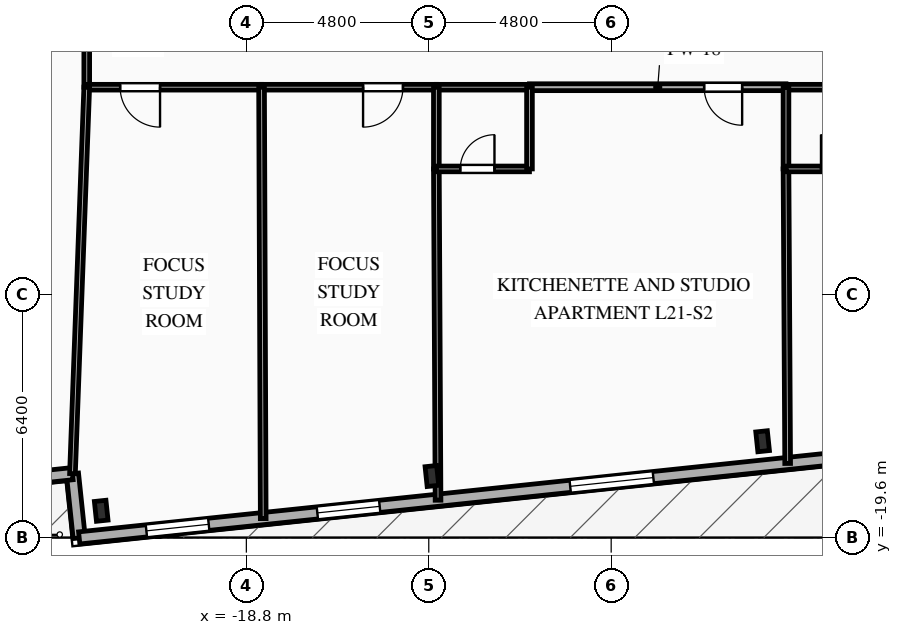
"""IFC4 building model, lengths in metres.
Left out: names, types, materials, properties, quantities, classifications, styles, units other than length and angle.
Written with IfcOpenShell. Run it as: python <this file> out.ifc"""

import sys

from ifc_helpers import new_model, si_unit, direction, frame, frame_2d, origin, origin_2d, place, context, subcontext, project, spatial, rectangle, i_section, extrude, element, fill, save


model = new_model("IFC4")
c1 = context("Model", 3, precision=1e-05, world=origin(), true_north=direction((0.0, 1.0)))
c2 = subcontext(c1, "Body", "Model", "MODEL_VIEW")
j1 = project(units=[si_unit("LENGTHUNIT", "METRE"), si_unit("PLANEANGLEUNIT", "RADIAN")], contexts=[c1])
p1 = place(None, origin())
s1 = spatial("IfcSite", under=j1, at=p1, CompositionType="ELEMENT")
p2 = place(p1, origin())
s2 = spatial("IfcBuilding", under=s1, at=p2, CompositionType="ELEMENT")
p3 = place(p2, frame((0.0, 0.0, 79.0)))
s3 = spatial("IfcBuildingStorey", under=s2, at=p3, CompositionType="ELEMENT", Elevation=79.0)
for number, where, z_axis, x_axis in (
    (1, (-22.619, -18.895, 0.0), (0.0, 0.0, 1.0), (0.995, 0.105, 0.0)),
    (2, (-13.917, -17.98, 0.0), (0.0, 0.0, 1.0), (0.995, 0.105, 0.0)),
    (3, (-5.215, -17.066, 0.0), (0.0, 0.0, 1.0), (0.995, 0.105, 0.0)),
):
    element("IfcColumn", number, at=place(p3, frame(where, z_axis=z_axis, x_axis=x_axis)), inside=s3, PredefinedType="COLUMN", context=c2, shape_type="SweptSolid", body=[
        extrude(i_section(OverallWidth=0.306, OverallDepth=0.524, WebThickness=0.021, FlangeThickness=0.04, FilletRadius=0.027, at=origin_2d()), origin(), (0.0, 0.0, 1.0), 3.35),
    ])
for number, where, z_axis, x_axis in (
    (4, (-23.198, -19.609, 0.0), (0.0, 0.0, 1.0), (-0.105, 0.995, 0.0)),
    (5, (-23.376, -17.919, 0.0), (0.0, 0.0, 1.0), (-0.995, -0.105, 0.0)),
):
    element("IfcWall", number, at=place(p3, frame(where, z_axis=z_axis, x_axis=x_axis)), inside=s3, PredefinedType="SOLIDWALL", context=c2, shape_type="SweptSolid", body=[
        extrude(rectangle(XDim=1.7, YDim=0.32, at=frame_2d((0.85, 0.0))), origin(), (0.0, 0.0, 1.0), 3.045),
    ])
p4 = place(p3, frame((30.307, -13.986, 0.0), z_axis=(0.0, 0.0, 1.0), x_axis=(-0.994521628355, -0.104531003701, 0.0)))
e6 = element("IfcWall", 6, at=p4, inside=s3, PredefinedType="SOLIDWALL", context=c2, shape_type="SweptSolid", body=[
    extrude(rectangle(XDim=53.8, YDim=0.32, at=frame_2d((26.9, 0.0))), origin(), (0.0, 0.0, 1.0), 3.045),
])
p5 = place(p4, frame((11.144, 0.0, 0.85)))
e7 = element("IfcOpeningElement", 7, at=p5, cuts=e6, PredefinedType="OPENING", context=c2, shape_type="SweptSolid", body=[
    extrude(rectangle(XDim=1.65, YDim=1.85, at=frame_2d((0.825, 0.925))), frame((0.0, 0.17, 0.0), z_axis=(0.0, -1.0, 0.0), x_axis=(1.0, 0.0, 0.0)), (0.0, 0.0, 1.0), 0.34),
])
p6 = place(p4, frame((20.116, 0.0, 0.85)))
e8 = element("IfcOpeningElement", 8, at=p6, cuts=e6, PredefinedType="OPENING", context=c2, shape_type="SweptSolid", body=[
    extrude(rectangle(XDim=2.2, YDim=1.85, at=frame_2d((1.1, 0.925))), frame((0.0, 0.17, 0.0), z_axis=(0.0, -1.0, 0.0), x_axis=(1.0, 0.0, 0.0)), (0.0, 0.0, 1.0), 0.34),
])
p7 = place(p4, frame((29.363, 0.0, 0.85)))
e9 = element("IfcOpeningElement", 9, at=p7, cuts=e6, PredefinedType="OPENING", context=c2, shape_type="SweptSolid", body=[
    extrude(rectangle(XDim=2.2, YDim=1.85, at=frame_2d((1.1, 0.925))), frame((0.0, 0.17, 0.0), z_axis=(0.0, -1.0, 0.0), x_axis=(1.0, 0.0, 0.0)), (0.0, 0.0, 1.0), 0.34),
])
p8 = place(p4, frame((38.61, 0.0, 0.85)))
e10 = element("IfcOpeningElement", 10, at=p8, cuts=e6, PredefinedType="OPENING", context=c2, shape_type="SweptSolid", body=[
    extrude(rectangle(XDim=2.2, YDim=1.85, at=frame_2d((1.1, 0.925))), frame((0.0, 0.17, 0.0), z_axis=(0.0, -1.0, 0.0), x_axis=(1.0, 0.0, 0.0)), (0.0, 0.0, 1.0), 0.34),
])
p9 = place(p4, frame((45.85, 0.0, 0.85)))
e11 = element("IfcOpeningElement", 11, at=p9, cuts=e6, PredefinedType="OPENING", context=c2, shape_type="SweptSolid", body=[
    extrude(rectangle(XDim=1.65, YDim=1.85, at=frame_2d((0.825, 0.925))), frame((0.0, 0.17, 0.0), z_axis=(0.0, -1.0, 0.0), x_axis=(1.0, 0.0, 0.0)), (0.0, 0.0, 1.0), 0.34),
])
p10 = place(p4, frame((50.373, 0.0, 0.85)))
e12 = element("IfcOpeningElement", 12, at=p10, cuts=e6, PredefinedType="OPENING", context=c2, shape_type="SweptSolid", body=[
    extrude(rectangle(XDim=1.65, YDim=1.85, at=frame_2d((0.825, 0.925))), frame((0.0, 0.17, 0.0), z_axis=(0.0, -1.0, 0.0), x_axis=(1.0, 0.0, 0.0)), (0.0, 0.0, 1.0), 0.34),
])
p11 = place(p3, frame((-23.0, -7.75, 0.0), z_axis=(0.0, 0.0, 1.0), x_axis=(0.0, 1.0, 0.0)))
e13 = element("IfcWall", 13, at=p11, inside=s3, PredefinedType="PARTITIONING", context=c2, shape_type="SweptSolid", body=[
    extrude(rectangle(XDim=2.15, YDim=0.15, at=frame_2d((1.075, 0.0))), origin(), (0.0, 0.0, 1.0), 2.7),
])
p12 = place(p3, frame((-18.4, -7.75, 0.0), z_axis=(0.0, 0.0, 1.0), x_axis=(-1.0, 0.0, 0.0)))
e14 = element("IfcWall", 14, at=p12, inside=s3, PredefinedType="PARTITIONING", context=c2, shape_type="SweptSolid", body=[
    extrude(rectangle(XDim=4.6, YDim=0.15, at=frame_2d((2.3, 0.0))), origin(), (0.0, 0.0, 1.0), 3.045),
])
p13 = place(p12, frame((2.671, 0.0, 0.0)))
e15 = element("IfcOpeningElement", 15, at=p13, cuts=e14, PredefinedType="OPENING", context=c2, shape_type="SweptSolid", body=[
    extrude(rectangle(XDim=1.05, YDim=2.15, at=frame_2d((0.525, 1.075))), frame((0.0, 0.085, 0.0), z_axis=(0.0, -1.0, 0.0), x_axis=(1.0, 0.0, 0.0)), (0.0, 0.0, 1.0), 0.17),
])
p14 = place(p3, frame((-13.8, -7.75, 0.0), z_axis=(0.0, 0.0, 1.0), x_axis=(-1.0, 0.0, 0.0)))
e16 = element("IfcWall", 16, at=p14, inside=s3, PredefinedType="PARTITIONING", context=c2, shape_type="SweptSolid", body=[
    extrude(rectangle(XDim=4.6, YDim=0.15, at=frame_2d((2.3, 0.0))), origin(), (0.0, 0.0, 1.0), 3.045),
])
p15 = place(p14, frame((0.879, 0.0, 0.0)))
e17 = element("IfcOpeningElement", 17, at=p15, cuts=e16, PredefinedType="OPENING", context=c2, shape_type="SweptSolid", body=[
    extrude(rectangle(XDim=1.05, YDim=2.15, at=frame_2d((0.525, 1.075))), frame((0.0, 0.085, 0.0), z_axis=(0.0, -1.0, 0.0), x_axis=(1.0, 0.0, 0.0)), (0.0, 0.0, 1.0), 0.17),
])
p16 = place(p3, frame((-4.6, -7.75, 0.0), z_axis=(0.0, 0.0, 1.0), x_axis=(-1.0, 0.0, 0.0)))
e18 = element("IfcWall", 18, at=p16, inside=s3, PredefinedType="PARTITIONING", context=c2, shape_type="SweptSolid", body=[
    extrude(rectangle(XDim=6.75, YDim=0.18, at=frame_2d((3.375, 0.0))), origin(), (0.0, 0.0, 1.0), 3.045),
])
p17 = place(p16, frame((1.154, 0.0, 0.0)))
e19 = element("IfcOpeningElement", 19, at=p17, cuts=e18, PredefinedType="OPENING", context=c2, shape_type="SweptSolid", body=[
    extrude(rectangle(XDim=1.0, YDim=2.15, at=frame_2d((0.5, 1.075))), frame((0.0, 0.1, 0.0), z_axis=(0.0, -1.0, 0.0), x_axis=(1.0, 0.0, 0.0)), (0.0, 0.0, 1.0), 0.2),
])
p18 = place(p3, frame((-11.35, -7.75, 0.0), z_axis=(0.0, 0.0, 1.0), x_axis=(-1.0, 0.0, 0.0)))
e20 = element("IfcWall", 20, at=p18, inside=s3, PredefinedType="PLUMBINGWALL", context=c2, shape_type="SweptSolid", body=[
    extrude(rectangle(XDim=2.45, YDim=0.15, at=frame_2d((1.225, 0.0))), origin(), (0.0, 0.0, 1.0), 3.045),
])
p19 = place(p3, frame((-2.15, -7.75, 0.0), z_axis=(0.0, 0.0, 1.0), x_axis=(-1.0, 0.0, 0.0)))
e21 = element("IfcWall", 21, at=p19, inside=s3, PredefinedType="PLUMBINGWALL", context=c2, shape_type="SweptSolid", body=[
    extrude(rectangle(XDim=2.45, YDim=0.15, at=frame_2d((1.225, 0.0))), origin(), (0.0, 0.0, 1.0), 3.045),
])
p20 = place(p3, frame((-23.0, -7.75, 0.0), z_axis=(0.0, 0.0, 1.0), x_axis=(-0.036924695214, -0.999318050914, 0.0)))
e22 = element("IfcWall", 22, at=p20, inside=s3, PredefinedType="PARTITIONING", context=c2, shape_type="SweptSolid", body=[
    extrude(rectangle(XDim=10.176, YDim=0.15, at=frame_2d((5.088, 0.0))), origin(), (0.0, 0.0, 1.0), 3.045),
])
p21 = place(p3, frame((-18.4, -7.75, 0.0), z_axis=(0.0, 0.0, 1.0), x_axis=(0.003850096217, -0.999992588352, 0.0)))
e23 = element("IfcWall", 23, at=p21, inside=s3, PredefinedType="PARTITIONING", context=c2, shape_type="SweptSolid", body=[
    extrude(rectangle(XDim=11.351, YDim=0.15, at=frame_2d((5.675, 0.0))), origin(), (0.0, 0.0, 1.0), 3.045),
])
p22 = place(p3, frame((-13.8, -9.9, 0.0), z_axis=(0.0, 0.0, 1.0), x_axis=(0.00504124668, -0.999987292835, 0.0)))
e24 = element("IfcWall", 24, at=p22, inside=s3, PredefinedType="PARTITIONING", context=c2, shape_type="SweptSolid", body=[
    extrude(rectangle(XDim=8.717, YDim=0.15, at=frame_2d((4.358, 0.0))), origin(), (0.0, 0.0, 1.0), 3.045),
])
p23 = place(p3, frame((-13.8, -7.75, 0.0), z_axis=(0.0, 0.0, 1.0), x_axis=(0.0, -1.0, 0.0)))
e25 = element("IfcWall", 25, at=p23, inside=s3, PredefinedType="PLUMBINGWALL", context=c2, shape_type="SweptSolid", body=[
    extrude(rectangle(XDim=2.15, YDim=0.15, at=frame_2d((1.075, 0.0))), origin(), (0.0, 0.0, 1.0), 3.045),
])
p24 = place(p3, frame((-13.8, -9.9, 0.0), z_axis=(0.0, 0.0, 1.0), x_axis=(1.0, 0.0, 0.0)))
e26 = element("IfcWall", 26, at=p24, inside=s3, PredefinedType="PLUMBINGWALL", context=c2, shape_type="SweptSolid", body=[
    extrude(rectangle(XDim=2.45, YDim=0.15, at=frame_2d((1.225, 0.0))), origin(), (0.0, 0.0, 1.0), 3.045),
])
p25 = place(p24, frame((0.629, 0.0, 0.0)))
e27 = element("IfcOpeningElement", 27, at=p25, cuts=e26, PredefinedType="OPENING", context=c2, shape_type="SweptSolid", body=[
    extrude(rectangle(XDim=0.9, YDim=2.1, at=frame_2d((0.45, 1.05))), frame((0.0, 0.085, 0.0), z_axis=(0.0, -1.0, 0.0), x_axis=(1.0, 0.0, 0.0)), (0.0, 0.0, 1.0), 0.17),
])
p26 = place(p3, frame((-11.35, -9.9, 0.0), z_axis=(0.0, 0.0, 1.0), x_axis=(0.0, 1.0, 0.0)))
e28 = element("IfcWall", 28, at=p26, inside=s3, PredefinedType="PLUMBINGWALL", context=c2, shape_type="SweptSolid", body=[
    extrude(rectangle(XDim=2.15, YDim=0.15, at=frame_2d((1.075, 0.0))), origin(), (0.0, 0.0, 1.0), 3.045),
])
p27 = place(p3, frame((-4.6, -9.9, 0.0), z_axis=(0.0, 0.0, 1.0), x_axis=(0.005670271746, -0.99998392388, 0.0)))
e29 = element("IfcWall", 29, at=p27, inside=s3, PredefinedType="PARTITIONING", context=c2, shape_type="SweptSolid", body=[
    extrude(rectangle(XDim=7.75, YDim=0.15, at=frame_2d((3.875, 0.0))), origin(), (0.0, 0.0, 1.0), 3.045),
])
p28 = place(p3, frame((-4.6, -7.75, 0.0), z_axis=(0.0, 0.0, 1.0), x_axis=(0.0, -1.0, 0.0)))
e30 = element("IfcWall", 30, at=p28, inside=s3, PredefinedType="PLUMBINGWALL", context=c2, shape_type="SweptSolid", body=[
    extrude(rectangle(XDim=2.15, YDim=0.15, at=frame_2d((1.075, 0.0))), origin(), (0.0, 0.0, 1.0), 3.045),
])
p29 = place(p3, frame((-4.6, -9.9, 0.0), z_axis=(0.0, 0.0, 1.0), x_axis=(1.0, 0.0, 0.0)))
e31 = element("IfcWall", 31, at=p29, inside=s3, PredefinedType="PLUMBINGWALL", context=c2, shape_type="SweptSolid", body=[
    extrude(rectangle(XDim=2.45, YDim=0.15, at=frame_2d((1.225, 0.0))), origin(), (0.0, 0.0, 1.0), 3.045),
])
p30 = place(p29, frame((0.921, 0.0, 0.0)))
e32 = element("IfcOpeningElement", 32, at=p30, cuts=e31, PredefinedType="OPENING", context=c2, shape_type="SweptSolid", body=[
    extrude(rectangle(XDim=0.9, YDim=2.1, at=frame_2d((0.45, 1.05))), frame((0.0, 0.085, 0.0), z_axis=(0.0, -1.0, 0.0), x_axis=(1.0, 0.0, 0.0)), (0.0, 0.0, 1.0), 0.17),
])
p31 = place(p8, origin())
e33 = element("IfcWindow", 33, at=p31, inside=s3, PartitioningType="SINGLE_PANEL", PredefinedType="WINDOW", context=c2, shape_type="SweptSolid", body=[
    extrude(rectangle(XDim=2.2, YDim=1.85, at=frame_2d((1.1, 0.925))), frame((0.0, 0.03, 0.0), z_axis=(0.0, -1.0, 0.0), x_axis=(1.0, 0.0, 0.0)), (0.0, 0.0, 1.0), 0.06),
])
fill(e10, e33)
p32 = place(p9, origin())
e34 = element("IfcWindow", 34, at=p32, inside=s3, PartitioningType="SINGLE_PANEL", PredefinedType="WINDOW", context=c2, shape_type="SweptSolid", body=[
    extrude(rectangle(XDim=1.65, YDim=1.85, at=frame_2d((0.825, 0.925))), frame((0.0, 0.03, 0.0), z_axis=(0.0, -1.0, 0.0), x_axis=(1.0, 0.0, 0.0)), (0.0, 0.0, 1.0), 0.06),
])
fill(e11, e34)
p33 = place(p10, origin())
e35 = element("IfcWindow", 35, at=p33, inside=s3, PartitioningType="SINGLE_PANEL", PredefinedType="WINDOW", context=c2, shape_type="SweptSolid", body=[
    extrude(rectangle(XDim=1.65, YDim=1.85, at=frame_2d((0.825, 0.925))), frame((0.0, 0.03, 0.0), z_axis=(0.0, -1.0, 0.0), x_axis=(1.0, 0.0, 0.0)), (0.0, 0.0, 1.0), 0.06),
])
fill(e12, e35)
p34 = place(p13, origin())
e36 = element("IfcDoor", 36, at=p34, inside=s3, OperationType="SINGLE_SWING_LEFT", PredefinedType="DOOR", context=c2, shape_type="SweptSolid", body=[
    extrude(rectangle(XDim=1.05, YDim=2.15, at=frame_2d((0.525, 1.075))), frame((0.0, 0.025, 0.0), z_axis=(0.0, -1.0, 0.0), x_axis=(1.0, 0.0, 0.0)), (0.0, 0.0, 1.0), 0.05),
])
fill(e15, e36)
p35 = place(p15, origin())
e37 = element("IfcDoor", 37, at=p35, inside=s3, OperationType="SINGLE_SWING_RIGHT", PredefinedType="DOOR", context=c2, shape_type="SweptSolid", body=[
    extrude(rectangle(XDim=1.05, YDim=2.15, at=frame_2d((0.525, 1.075))), frame((0.0, 0.025, 0.0), z_axis=(0.0, -1.0, 0.0), x_axis=(1.0, 0.0, 0.0)), (0.0, 0.0, 1.0), 0.05),
])
fill(e17, e37)
p36 = place(p17, origin())
e38 = element("IfcDoor", 38, at=p36, inside=s3, OperationType="SINGLE_SWING_LEFT", PredefinedType="DOOR", context=c2, shape_type="SweptSolid", body=[
    extrude(rectangle(XDim=1.0, YDim=2.15, at=frame_2d((0.5, 1.075))), frame((0.0, 0.025, 0.0), z_axis=(0.0, -1.0, 0.0), x_axis=(1.0, 0.0, 0.0)), (0.0, 0.0, 1.0), 0.05),
])
fill(e19, e38)
p37 = place(p25, origin())
e39 = element("IfcDoor", 39, at=p37, inside=s3, OperationType="SINGLE_SWING_RIGHT", PredefinedType="DOOR", context=c2, shape_type="SweptSolid", body=[
    extrude(rectangle(XDim=0.9, YDim=2.1, at=frame_2d((0.45, 1.05))), frame((0.0, 0.025, 0.0), z_axis=(0.0, -1.0, 0.0), x_axis=(1.0, 0.0, 0.0)), (0.0, 0.0, 1.0), 0.05),
])
fill(e27, e39)
p38 = place(p30, origin())
e40 = element("IfcDoor", 40, at=p38, inside=s3, OperationType="SINGLE_SWING_LEFT", PredefinedType="DOOR", context=c2, shape_type="SweptSolid", body=[
    extrude(rectangle(XDim=0.9, YDim=2.1, at=frame_2d((0.45, 1.05))), frame((0.0, 0.025, 0.0), z_axis=(0.0, -1.0, 0.0), x_axis=(1.0, 0.0, 0.0)), (0.0, 0.0, 1.0), 0.05),
])
fill(e32, e40)
save(model, sys.argv[1])
